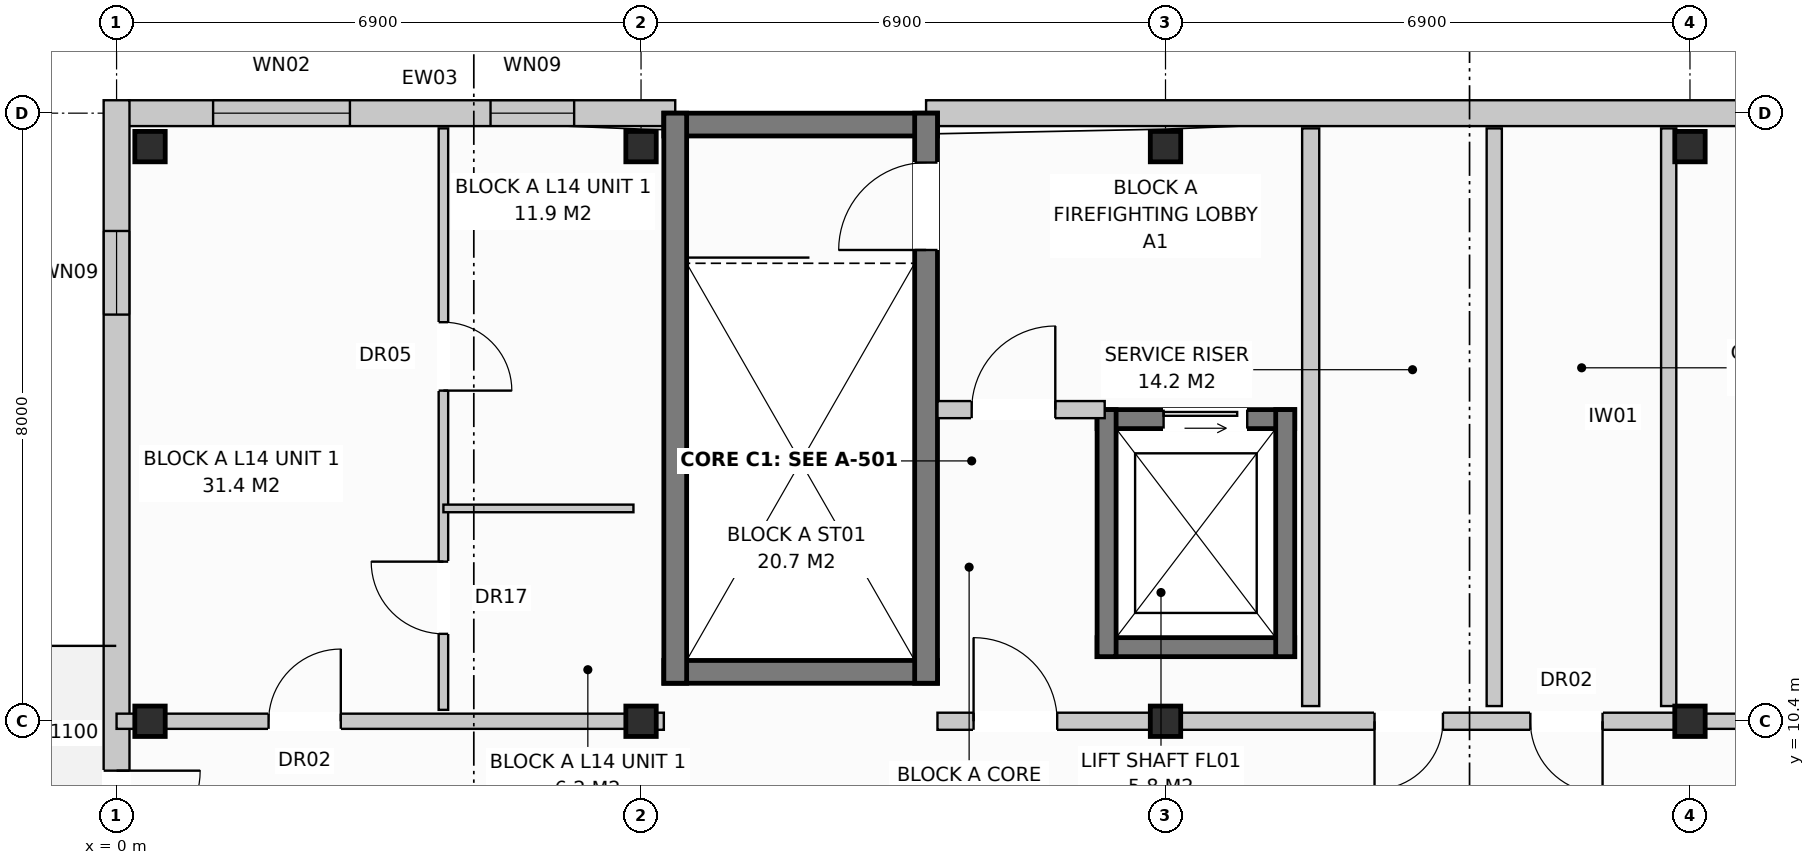
"""IFC4 building model, lengths in metres.
Left out: names, types, materials, properties, quantities, classifications, styles, units other than length and angle.
Written with IfcOpenShell. Run it as: python <this file> out.ifc"""

import sys

from ifc_helpers import new_model, si_unit, direction, frame, frame_2d, origin, origin_with_axes, origin_2d, place, context, subcontext, project, spatial, rectangle, extrude, element, fill, save


model = new_model("IFC4")
c1 = context("Model", 3, precision=1e-05, world=origin(), true_north=direction((0.0, 1.0)))
c2 = subcontext(c1, "Body", "Model", "MODEL_VIEW")
j1 = project(units=[si_unit("LENGTHUNIT", "METRE"), si_unit("PLANEANGLEUNIT", "RADIAN")], contexts=[c1])
p1 = place(None, origin())
s1 = spatial("IfcSite", under=j1, at=p1, CompositionType="ELEMENT")
p2 = place(p1, origin())
s2 = spatial("IfcBuilding", under=s1, at=p2, CompositionType="ELEMENT")
p3 = place(p2, frame((0.0, 0.0, 46.4)))
s3 = spatial("IfcBuildingStorey", under=s2, at=p3, CompositionType="ELEMENT", Elevation=46.4)
for number, where, z_axis, x_axis in (
    (1, (0.44, 10.4, 0.0), (0.0, 0.0, 1.0), (1.0, 0.0, 0.0)),
    (2, (0.44, 17.96, 0.0), (0.0, 0.0, 1.0), (1.0, 0.0, 0.0)),
    (3, (6.9, 10.4, 0.0), (0.0, 0.0, 1.0), (1.0, 0.0, 0.0)),
    (4, (6.9, 17.96, 0.0), (0.0, 0.0, 1.0), (1.0, 0.0, 0.0)),
    (5, (13.8, 10.4, 0.0), (0.0, 0.0, 1.0), (1.0, 0.0, 0.0)),
    (6, (13.8, 17.96, 0.0), (0.0, 0.0, 1.0), (1.0, 0.0, 0.0)),
    (7, (20.7, 10.4, 0.0), (0.0, 0.0, 1.0), (1.0, 0.0, 0.0)),
    (8, (20.7, 17.96, 0.0), (0.0, 0.0, 1.0), (1.0, 0.0, 0.0)),
):
    element("IfcColumn", number, at=place(p3, frame(where, z_axis=z_axis, x_axis=x_axis)), inside=s3, PredefinedType="COLUMN", context=c2, shape_type="SweptSolid", body=[
        extrude(rectangle(XDim=0.4, YDim=0.4, at=origin_2d()), origin(), (0.0, 0.0, 1.0), 3.2),
    ])
p4 = place(p3, frame((0.16, 18.4, 0.0), z_axis=(0.0, 0.0, 1.0), x_axis=(1.0, 0.0, 0.0)))
e9 = element("IfcWall", 9, at=p4, inside=s3, PredefinedType="STANDARD", context=c2, shape_type="SweptSolid", body=[
    extrude(rectangle(XDim=7.19, YDim=0.34, at=frame_2d((3.595, 0.0))), origin(), (0.0, 0.0, 1.0), 2.91),
])
p5 = place(p4, frame((1.11, 0.0, 0.8)))
e10 = element("IfcOpeningElement", 10, at=p5, cuts=e9, PredefinedType="OPENING", context=c2, shape_type="SweptSolid", body=[
    extrude(rectangle(XDim=1.8, YDim=1.7, at=frame_2d((0.9, 0.85))), frame((0.0, 0.182, 0.0), z_axis=(0.0, -1.0, 0.0), x_axis=(1.0, 0.0, 0.0)), (0.0, 0.0, 1.0), 0.364),
])
p6 = place(p4, frame((4.76, 0.0, 0.72)))
e11 = element("IfcOpeningElement", 11, at=p6, cuts=e9, PredefinedType="OPENING", context=c2, shape_type="SweptSolid", body=[
    extrude(rectangle(XDim=1.1, YDim=1.5, at=frame_2d((0.55, 0.75))), frame((0.0, 0.182, 0.0), z_axis=(0.0, -1.0, 0.0), x_axis=(1.0, 0.0, 0.0)), (0.0, 0.0, 1.0), 0.364),
])
p7 = place(p3, frame((10.65, 18.4, 0.0), z_axis=(0.0, 0.0, 1.0), x_axis=(1.0, 0.0, 0.0)))
e12 = element("IfcWall", 12, at=p7, inside=s3, PredefinedType="STANDARD", context=c2, shape_type="SweptSolid", body=[
    extrude(rectangle(XDim=17.4, YDim=0.34, at=frame_2d((8.7, 0.0))), origin(), (0.0, 0.0, 1.0), 2.91),
])
p8 = place(p7, frame((11.837, 0.0, 0.0)))
e13 = element("IfcOpeningElement", 13, at=p8, cuts=e12, PredefinedType="OPENING", context=c2, shape_type="SweptSolid", body=[
    extrude(rectangle(XDim=1.05, YDim=2.12, at=frame_2d((0.525, 1.06))), frame((0.0, 0.182, 0.0), z_axis=(0.0, -1.0, 0.0), x_axis=(1.0, 0.0, 0.0)), (0.0, 0.0, 1.0), 0.364),
])
p9 = place(p7, frame((14.87, 0.0, 0.72)))
e14 = element("IfcOpeningElement", 14, at=p9, cuts=e12, PredefinedType="OPENING", context=c2, shape_type="SweptSolid", body=[
    extrude(rectangle(XDim=1.1, YDim=1.5, at=frame_2d((0.55, 0.75))), frame((0.0, 0.182, 0.0), z_axis=(0.0, -1.0, 0.0), x_axis=(1.0, 0.0, 0.0)), (0.0, 0.0, 1.0), 0.364),
])
p10 = place(p3, frame((0.0, -0.17, 0.0), z_axis=(0.0, 0.0, 1.0), x_axis=(0.0, 1.0, 0.0)))
e15 = element("IfcWall", 15, at=p10, inside=s3, PredefinedType="STANDARD", context=c2, shape_type="SweptSolid", body=[
    extrude(rectangle(XDim=18.74, YDim=0.34, at=frame_2d((9.37, 0.0))), origin(), (0.0, 0.0, 1.0), 2.91),
])
p11 = place(p10, frame((8.82, 0.0, 0.0)))
e16 = element("IfcOpeningElement", 16, at=p11, cuts=e15, PredefinedType="OPENING", context=c2, shape_type="SweptSolid", body=[
    extrude(rectangle(XDim=1.1, YDim=2.1, at=frame_2d((0.55, 1.05))), frame((0.0, 0.182, 0.0), z_axis=(0.0, -1.0, 0.0), x_axis=(1.0, 0.0, 0.0)), (0.0, 0.0, 1.0), 0.364),
])
p12 = place(p10, frame((1.72, 0.0, 0.72)))
e17 = element("IfcOpeningElement", 17, at=p12, cuts=e15, PredefinedType="OPENING", context=c2, shape_type="SweptSolid", body=[
    extrude(rectangle(XDim=1.1, YDim=1.5, at=frame_2d((0.55, 0.75))), frame((0.0, 0.182, 0.0), z_axis=(0.0, -1.0, 0.0), x_axis=(1.0, 0.0, 0.0)), (0.0, 0.0, 1.0), 0.364),
])
p13 = place(p10, frame((15.92, 0.0, 0.72)))
e18 = element("IfcOpeningElement", 18, at=p13, cuts=e15, PredefinedType="OPENING", context=c2, shape_type="SweptSolid", body=[
    extrude(rectangle(XDim=1.1, YDim=1.5, at=frame_2d((0.55, 0.75))), frame((0.0, 0.182, 0.0), z_axis=(0.0, -1.0, 0.0), x_axis=(1.0, 0.0, 0.0)), (0.0, 0.0, 1.0), 0.364),
])
for number, where, z_axis, x_axis in (
    (19, (7.2, 18.25, 0.0), (0.0, 0.0, 1.0), (1.0, 0.0, 0.0)),
    (20, (7.2, 11.05, 0.0), (0.0, 0.0, 1.0), (1.0, 0.0, 0.0)),
):
    element("IfcWall", number, at=place(p3, frame(where, z_axis=z_axis, x_axis=x_axis)), inside=s3, PredefinedType="SHEAR", context=c2, shape_type="SweptSolid", body=[
        extrude(rectangle(XDim=3.6, YDim=0.3, at=frame_2d((1.8, 0.0))), origin(), (0.0, 0.0, 1.0), 2.91),
    ])
p14 = place(p3, frame((7.35, 10.9, 0.0), z_axis=(0.0, 0.0, 1.0), x_axis=(0.0, 1.0, 0.0)))
e21 = element("IfcWall", 21, at=p14, inside=s3, PredefinedType="SHEAR", context=c2, shape_type="SweptSolid", body=[
    extrude(rectangle(XDim=7.5, YDim=0.3, at=frame_2d((3.75, 0.0))), origin(), (0.0, 0.0, 1.0), 2.91),
])
p15 = place(p3, frame((10.65, 10.9, 0.0), z_axis=(0.0, 0.0, 1.0), x_axis=(0.0, 1.0, 0.0)))
e22 = element("IfcWall", 22, at=p15, inside=s3, PredefinedType="SHEAR", context=c2, shape_type="SweptSolid", body=[
    extrude(rectangle(XDim=7.5, YDim=0.3, at=frame_2d((3.75, 0.0))), origin(), (0.0, 0.0, 1.0), 2.91),
])
p16 = place(p15, frame((5.7, 0.0, 0.0)))
e23 = element("IfcOpeningElement", 23, at=p16, cuts=e22, PredefinedType="OPENING", context=c2, shape_type="SweptSolid", body=[
    extrude(rectangle(XDim=1.15, YDim=2.15, at=frame_2d((0.575, 1.075))), frame((0.0, 0.162, 0.0), z_axis=(0.0, -1.0, 0.0), x_axis=(1.0, 0.0, 0.0)), (0.0, 0.0, 1.0), 0.324),
])
p17 = place(p3, frame((12.9, 14.375, 0.0), z_axis=(0.0, 0.0, 1.0), x_axis=(1.0, 0.0, 0.0)))
e24 = element("IfcWall", 24, at=p17, inside=s3, PredefinedType="SHEAR", context=c2, shape_type="SweptSolid", body=[
    extrude(rectangle(XDim=2.6, YDim=0.25, at=frame_2d((1.3, 0.0))), origin(), (0.0, 0.0, 1.0), 2.91),
])
p18 = place(p17, frame((0.875, 0.0, 0.0)))
e25 = element("IfcOpeningElement", 25, at=p18, cuts=e24, PredefinedType="OPENING", context=c2, shape_type="SweptSolid", body=[
    extrude(rectangle(XDim=1.1, YDim=2.1, at=frame_2d((0.55, 1.05))), frame((0.0, 0.137, 0.0), z_axis=(0.0, -1.0, 0.0), x_axis=(1.0, 0.0, 0.0)), (0.0, 0.0, 1.0), 0.274),
])
p19 = place(p3, frame((12.9, 11.375, 0.0), z_axis=(0.0, 0.0, 1.0), x_axis=(1.0, 0.0, 0.0)))
e26 = element("IfcWall", 26, at=p19, inside=s3, PredefinedType="SHEAR", context=c2, shape_type="SweptSolid", body=[
    extrude(rectangle(XDim=2.6, YDim=0.25, at=frame_2d((1.3, 0.0))), origin(), (0.0, 0.0, 1.0), 2.91),
])
for number, where, z_axis, x_axis in (
    (27, (13.025, 11.25, 0.0), (0.0, 0.0, 1.0), (0.0, 1.0, 0.0)),
    (28, (15.375, 11.25, 0.0), (0.0, 0.0, 1.0), (0.0, 1.0, 0.0)),
):
    element("IfcWall", number, at=place(p3, frame(where, z_axis=z_axis, x_axis=x_axis)), inside=s3, PredefinedType="SHEAR", context=c2, shape_type="SweptSolid", body=[
        extrude(rectangle(XDim=3.25, YDim=0.25, at=frame_2d((1.625, 0.0))), origin(), (0.0, 0.0, 1.0), 2.91),
    ])
p20 = place(p3, frame((15.71, 10.6, 0.0), z_axis=(0.0, 0.0, 1.0), x_axis=(0.0, 1.0, 0.0)))
e29 = element("IfcWall", 29, at=p20, inside=s3, PredefinedType="PARTITIONING", context=c2, shape_type="SweptSolid", body=[
    extrude(rectangle(XDim=7.6, YDim=0.225, at=frame_2d((3.8, 0.0))), origin(), (0.0, 0.0, 1.0), 2.59),
])
p21 = place(p3, frame((10.8, 14.5, 0.0), z_axis=(0.0, 0.0, 1.0), x_axis=(1.0, 0.0, 0.0)))
e30 = element("IfcWall", 30, at=p21, inside=s3, PredefinedType="PARTITIONING", context=c2, shape_type="SweptSolid", body=[
    extrude(rectangle(XDim=2.2, YDim=0.225, at=frame_2d((1.1, 0.0))), origin(), (0.0, 0.0, 1.0), 2.91),
])
p22 = place(p21, frame((0.45, 0.0, 0.0)))
e31 = element("IfcOpeningElement", 31, at=p22, cuts=e30, PredefinedType="OPENING", context=c2, shape_type="SweptSolid", body=[
    extrude(rectangle(XDim=1.1, YDim=2.15, at=frame_2d((0.55, 1.075))), frame((0.0, 0.125, 0.0), z_axis=(0.0, -1.0, 0.0), x_axis=(1.0, 0.0, 0.0)), (0.0, 0.0, 1.0), 0.249),
])
p23 = place(p3, frame((6.9, 10.4, 0.0), z_axis=(0.0, 0.0, 1.0), x_axis=(1.0, 0.0, 0.0)))
e32 = element("IfcWall", 32, at=p23, inside=s3, PredefinedType="PARTITIONING", context=c2, shape_type="SweptSolid", body=[
    extrude(rectangle(XDim=0.3, YDim=0.225, at=frame_2d((0.15, 0.0))), origin(), (0.0, 0.0, 1.0), 2.91),
])
for number, where, z_axis, x_axis in (
    (33, (18.125, 10.6, 0.0), (0.0, 0.0, 1.0), (0.0, 1.0, 0.0)),
    (34, (20.42, 10.6, 0.0), (0.0, 0.0, 1.0), (0.0, 1.0, 0.0)),
):
    element("IfcWall", number, at=place(p3, frame(where, z_axis=z_axis, x_axis=x_axis)), inside=s3, PredefinedType="PARTITIONING", context=c2, shape_type="SweptSolid", body=[
        extrude(rectangle(XDim=7.6, YDim=0.2, at=frame_2d((3.8, 0.0))), origin(), (0.0, 0.0, 1.0), 2.91),
    ])
p24 = place(p3, frame((10.8, 10.4, 0.0), z_axis=(0.0, 0.0, 1.0), x_axis=(1.0, 0.0, 0.0)))
e35 = element("IfcWall", 35, at=p24, inside=s3, PredefinedType="PARTITIONING", context=c2, shape_type="SweptSolid", body=[
    extrude(rectangle(XDim=9.9, YDim=0.225, at=frame_2d((4.95, 0.0))), origin(), (0.0, 0.0, 1.0), 2.35),
])
p25 = place(p24, frame((0.475, 0.0, 0.0)))
e36 = element("IfcOpeningElement", 36, at=p25, cuts=e35, PredefinedType="OPENING", context=c2, shape_type="SweptSolid", body=[
    extrude(rectangle(XDim=1.1, YDim=2.15, at=frame_2d((0.55, 1.075))), frame((0.0, 0.125, 0.0), z_axis=(0.0, -1.0, 0.0), x_axis=(1.0, 0.0, 0.0)), (0.0, 0.0, 1.0), 0.249),
])
p26 = place(p24, frame((5.75, 0.0, 0.0)))
e37 = element("IfcOpeningElement", 37, at=p26, cuts=e35, PredefinedType="OPENING", context=c2, shape_type="SweptSolid", body=[
    extrude(rectangle(XDim=0.9, YDim=2.1, at=frame_2d((0.45, 1.05))), frame((0.0, 0.125, 0.0), z_axis=(0.0, -1.0, 0.0), x_axis=(1.0, 0.0, 0.0)), (0.0, 0.0, 1.0), 0.249),
])
p27 = place(p24, frame((7.8, 0.0, 0.0)))
e38 = element("IfcOpeningElement", 38, at=p27, cuts=e35, PredefinedType="OPENING", context=c2, shape_type="SweptSolid", body=[
    extrude(rectangle(XDim=0.95, YDim=2.15, at=frame_2d((0.475, 1.075))), frame((0.0, 0.125, 0.0), z_axis=(0.0, -1.0, 0.0), x_axis=(1.0, 0.0, 0.0)), (0.0, 0.0, 1.0), 0.249),
])
p28 = place(p3, frame((0.0, 10.4, 0.0), z_axis=(0.0, 0.0, 1.0), x_axis=(1.0, 0.0, 0.0)))
e39 = element("IfcWall", 39, at=p28, inside=s3, PredefinedType="PARTITIONING", context=c2, shape_type="SweptSolid", body=[
    extrude(rectangle(XDim=6.9, YDim=0.2, at=frame_2d((3.45, 0.0))), origin(), (0.0, 0.0, 1.0), 2.35),
])
p29 = place(p28, frame((2.0, 0.0, 0.0)))
e40 = element("IfcOpeningElement", 40, at=p29, cuts=e39, PredefinedType="OPENING", context=c2, shape_type="SweptSolid", body=[
    extrude(rectangle(XDim=0.95, YDim=2.15, at=frame_2d((0.475, 1.075))), frame((0.0, 0.112, 0.0), z_axis=(0.0, -1.0, 0.0), x_axis=(1.0, 0.0, 0.0)), (0.0, 0.0, 1.0), 0.224),
])
p30 = place(p3, frame((4.3, 10.55, 0.0), z_axis=(0.0, 0.0, 1.0), x_axis=(0.0, 1.0, 0.0)))
e41 = element("IfcWall", 41, at=p30, inside=s3, PredefinedType="PARTITIONING", context=c2, shape_type="SweptSolid", body=[
    extrude(rectangle(XDim=7.65, YDim=0.125, at=frame_2d((3.825, 0.0))), origin(), (0.0, 0.0, 1.0), 2.91),
])
p31 = place(p30, frame((1.0, 0.0, 0.0)))
e42 = element("IfcOpeningElement", 42, at=p31, cuts=e41, PredefinedType="OPENING", context=c2, shape_type="SweptSolid", body=[
    extrude(rectangle(XDim=0.95, YDim=2.1, at=frame_2d((0.475, 1.05))), frame((0.0, 0.074, 0.0), z_axis=(0.0, -1.0, 0.0), x_axis=(1.0, 0.0, 0.0)), (0.0, 0.0, 1.0), 0.149),
])
p32 = place(p30, frame((4.2, 0.0, 0.0)))
e43 = element("IfcOpeningElement", 43, at=p32, cuts=e41, PredefinedType="OPENING", context=c2, shape_type="SweptSolid", body=[
    extrude(rectangle(XDim=0.9, YDim=2.1, at=frame_2d((0.45, 1.05))), frame((0.0, 0.074, 0.0), z_axis=(0.0, -1.0, 0.0), x_axis=(1.0, 0.0, 0.0)), (0.0, 0.0, 1.0), 0.149),
])
p33 = place(p3, frame((4.3, 13.2, 0.0), z_axis=(0.0, 0.0, 1.0), x_axis=(1.0, 0.0, 0.0)))
e44 = element("IfcWall", 44, at=p33, inside=s3, PredefinedType="PARTITIONING", context=c2, shape_type="SweptSolid", body=[
    extrude(rectangle(XDim=2.5, YDim=0.1, at=frame_2d((1.25, 0.0))), origin(), (0.0, 0.0, 1.0), 2.91),
])
p34 = place(p3, frame((20.7, 10.4, 0.0), z_axis=(0.0, 0.0, 1.0), x_axis=(1.0, 0.0, 0.0)))
e45 = element("IfcWall", 45, at=p34, inside=s3, PredefinedType="PARTITIONING", context=c2, shape_type="SweptSolid", body=[
    extrude(rectangle(XDim=6.9, YDim=0.2, at=frame_2d((3.45, 0.0))), origin(), (0.0, 0.0, 1.0), 2.35),
])
p35 = place(p34, frame((2.0, 0.0, 0.0)))
e46 = element("IfcOpeningElement", 46, at=p35, cuts=e45, PredefinedType="OPENING", context=c2, shape_type="SweptSolid", body=[
    extrude(rectangle(XDim=0.95, YDim=2.15, at=frame_2d((0.475, 1.075))), frame((0.0, 0.112, 0.0), z_axis=(0.0, -1.0, 0.0), x_axis=(1.0, 0.0, 0.0)), (0.0, 0.0, 1.0), 0.224),
])
p36 = place(p5, origin_with_axes())
e47 = element("IfcWindow", 47, at=p36, inside=s3, PartitioningType="SINGLE_PANEL", PredefinedType="WINDOW", context=c2, shape_type="SweptSolid", body=[
    extrude(rectangle(XDim=1.8, YDim=1.7, at=frame_2d((0.9, 0.85))), frame((0.0, 0.03, 0.0), z_axis=(0.0, -1.0, 0.0), x_axis=(1.0, 0.0, 0.0)), (0.0, 0.0, 1.0), 0.06),
])
fill(e10, e47)
p37 = place(p6, origin_with_axes())
e48 = element("IfcWindow", 48, at=p37, inside=s3, PartitioningType="SINGLE_PANEL", PredefinedType="WINDOW", context=c2, shape_type="SweptSolid", body=[
    extrude(rectangle(XDim=1.1, YDim=1.5, at=frame_2d((0.55, 0.75))), frame((0.0, 0.03, 0.0), z_axis=(0.0, -1.0, 0.0), x_axis=(1.0, 0.0, 0.0)), (0.0, 0.0, 1.0), 0.06),
])
fill(e11, e48)
p38 = place(p11, frame((1.1, 0.0, 0.0), z_axis=(0.0, 0.0, 1.0), x_axis=(-1.0, 0.0, 0.0)))
e49 = element("IfcDoor", 49, at=p38, inside=s3, OperationType="SINGLE_SWING_RIGHT", PredefinedType="DOOR", context=c2, shape_type="SweptSolid", body=[
    extrude(rectangle(XDim=1.1, YDim=2.1, at=frame_2d((0.55, 1.05))), frame((0.0, 0.025, 0.0), z_axis=(0.0, -1.0, 0.0), x_axis=(1.0, 0.0, 0.0)), (0.0, 0.0, 1.0), 0.05),
])
fill(e16, e49)
p39 = place(p13, origin_with_axes())
e50 = element("IfcWindow", 50, at=p39, inside=s3, PartitioningType="SINGLE_PANEL", PredefinedType="WINDOW", context=c2, shape_type="SweptSolid", body=[
    extrude(rectangle(XDim=1.1, YDim=1.5, at=frame_2d((0.55, 0.75))), frame((0.0, 0.03, 0.0), z_axis=(0.0, -1.0, 0.0), x_axis=(1.0, 0.0, 0.0)), (0.0, 0.0, 1.0), 0.06),
])
fill(e18, e50)
p40 = place(p16, origin_with_axes())
e51 = element("IfcDoor", 51, at=p40, inside=s3, OperationType="SINGLE_SWING_LEFT", PredefinedType="DOOR", context=c2, shape_type="SweptSolid", body=[
    extrude(rectangle(XDim=1.15, YDim=2.15, at=frame_2d((0.575, 1.075))), frame((0.0, 0.025, 0.0), z_axis=(0.0, -1.0, 0.0), x_axis=(1.0, 0.0, 0.0)), (0.0, 0.0, 1.0), 0.05),
])
fill(e23, e51)
p41 = place(p18, origin_with_axes())
e52 = element("IfcDoor", 52, at=p41, inside=s3, OperationType="SLIDING_TO_LEFT", PredefinedType="DOOR", context=c2, shape_type="SweptSolid", body=[
    extrude(rectangle(XDim=1.1, YDim=2.1, at=frame_2d((0.55, 1.05))), frame((0.0, 0.025, 0.0), z_axis=(0.0, -1.0, 0.0), x_axis=(1.0, 0.0, 0.0)), (0.0, 0.0, 1.0), 0.05),
])
fill(e25, e52)
p42 = place(p22, origin_with_axes())
e53 = element("IfcDoor", 53, at=p42, inside=s3, OperationType="SINGLE_SWING_RIGHT", PredefinedType="DOOR", context=c2, shape_type="SweptSolid", body=[
    extrude(rectangle(XDim=1.1, YDim=2.15, at=frame_2d((0.55, 1.075))), frame((0.0, 0.025, 0.0), z_axis=(0.0, -1.0, 0.0), x_axis=(1.0, 0.0, 0.0)), (0.0, 0.0, 1.0), 0.05),
])
fill(e31, e53)
p43 = place(p25, origin_with_axes())
e54 = element("IfcDoor", 54, at=p43, inside=s3, OperationType="SINGLE_SWING_LEFT", PredefinedType="DOOR", context=c2, shape_type="SweptSolid", body=[
    extrude(rectangle(XDim=1.1, YDim=2.15, at=frame_2d((0.55, 1.075))), frame((0.0, 0.025, 0.0), z_axis=(0.0, -1.0, 0.0), x_axis=(1.0, 0.0, 0.0)), (0.0, 0.0, 1.0), 0.05),
])
fill(e36, e54)
p44 = place(p26, frame((0.9, 0.0, 0.0), z_axis=(0.0, 0.0, 1.0), x_axis=(-1.0, 0.0, 0.0)))
e55 = element("IfcDoor", 55, at=p44, inside=s3, OperationType="SINGLE_SWING_LEFT", PredefinedType="DOOR", context=c2, shape_type="SweptSolid", body=[
    extrude(rectangle(XDim=0.9, YDim=2.1, at=frame_2d((0.45, 1.05))), frame((0.0, 0.025, 0.0), z_axis=(0.0, -1.0, 0.0), x_axis=(1.0, 0.0, 0.0)), (0.0, 0.0, 1.0), 0.05),
])
fill(e37, e55)
p45 = place(p27, frame((0.95, 0.0, 0.0), z_axis=(0.0, 0.0, 1.0), x_axis=(-1.0, 0.0, 0.0)))
e56 = element("IfcDoor", 56, at=p45, inside=s3, OperationType="SINGLE_SWING_RIGHT", PredefinedType="DOOR", context=c2, shape_type="SweptSolid", body=[
    extrude(rectangle(XDim=0.95, YDim=2.15, at=frame_2d((0.475, 1.075))), frame((0.0, 0.025, 0.0), z_axis=(0.0, -1.0, 0.0), x_axis=(1.0, 0.0, 0.0)), (0.0, 0.0, 1.0), 0.05),
])
fill(e38, e56)
p46 = place(p29, origin_with_axes())
e57 = element("IfcDoor", 57, at=p46, inside=s3, OperationType="SINGLE_SWING_RIGHT", PredefinedType="DOOR", context=c2, shape_type="SweptSolid", body=[
    extrude(rectangle(XDim=0.95, YDim=2.15, at=frame_2d((0.475, 1.075))), frame((0.0, 0.025, 0.0), z_axis=(0.0, -1.0, 0.0), x_axis=(1.0, 0.0, 0.0)), (0.0, 0.0, 1.0), 0.05),
])
fill(e40, e57)
p47 = place(p31, origin_with_axes())
e58 = element("IfcDoor", 58, at=p47, inside=s3, OperationType="SINGLE_SWING_RIGHT", PredefinedType="DOOR", context=c2, shape_type="SweptSolid", body=[
    extrude(rectangle(XDim=0.95, YDim=2.1, at=frame_2d((0.475, 1.05))), frame((0.0, 0.025, 0.0), z_axis=(0.0, -1.0, 0.0), x_axis=(1.0, 0.0, 0.0)), (0.0, 0.0, 1.0), 0.05),
])
fill(e42, e58)
p48 = place(p32, frame((0.9, 0.0, 0.0), z_axis=(0.0, 0.0, 1.0), x_axis=(-1.0, 0.0, 0.0)))
e59 = element("IfcDoor", 59, at=p48, inside=s3, OperationType="SINGLE_SWING_LEFT", PredefinedType="DOOR", context=c2, shape_type="SweptSolid", body=[
    extrude(rectangle(XDim=0.9, YDim=2.1, at=frame_2d((0.45, 1.05))), frame((0.0, 0.025, 0.0), z_axis=(0.0, -1.0, 0.0), x_axis=(1.0, 0.0, 0.0)), (0.0, 0.0, 1.0), 0.05),
])
fill(e43, e59)
save(model, sys.argv[1])
